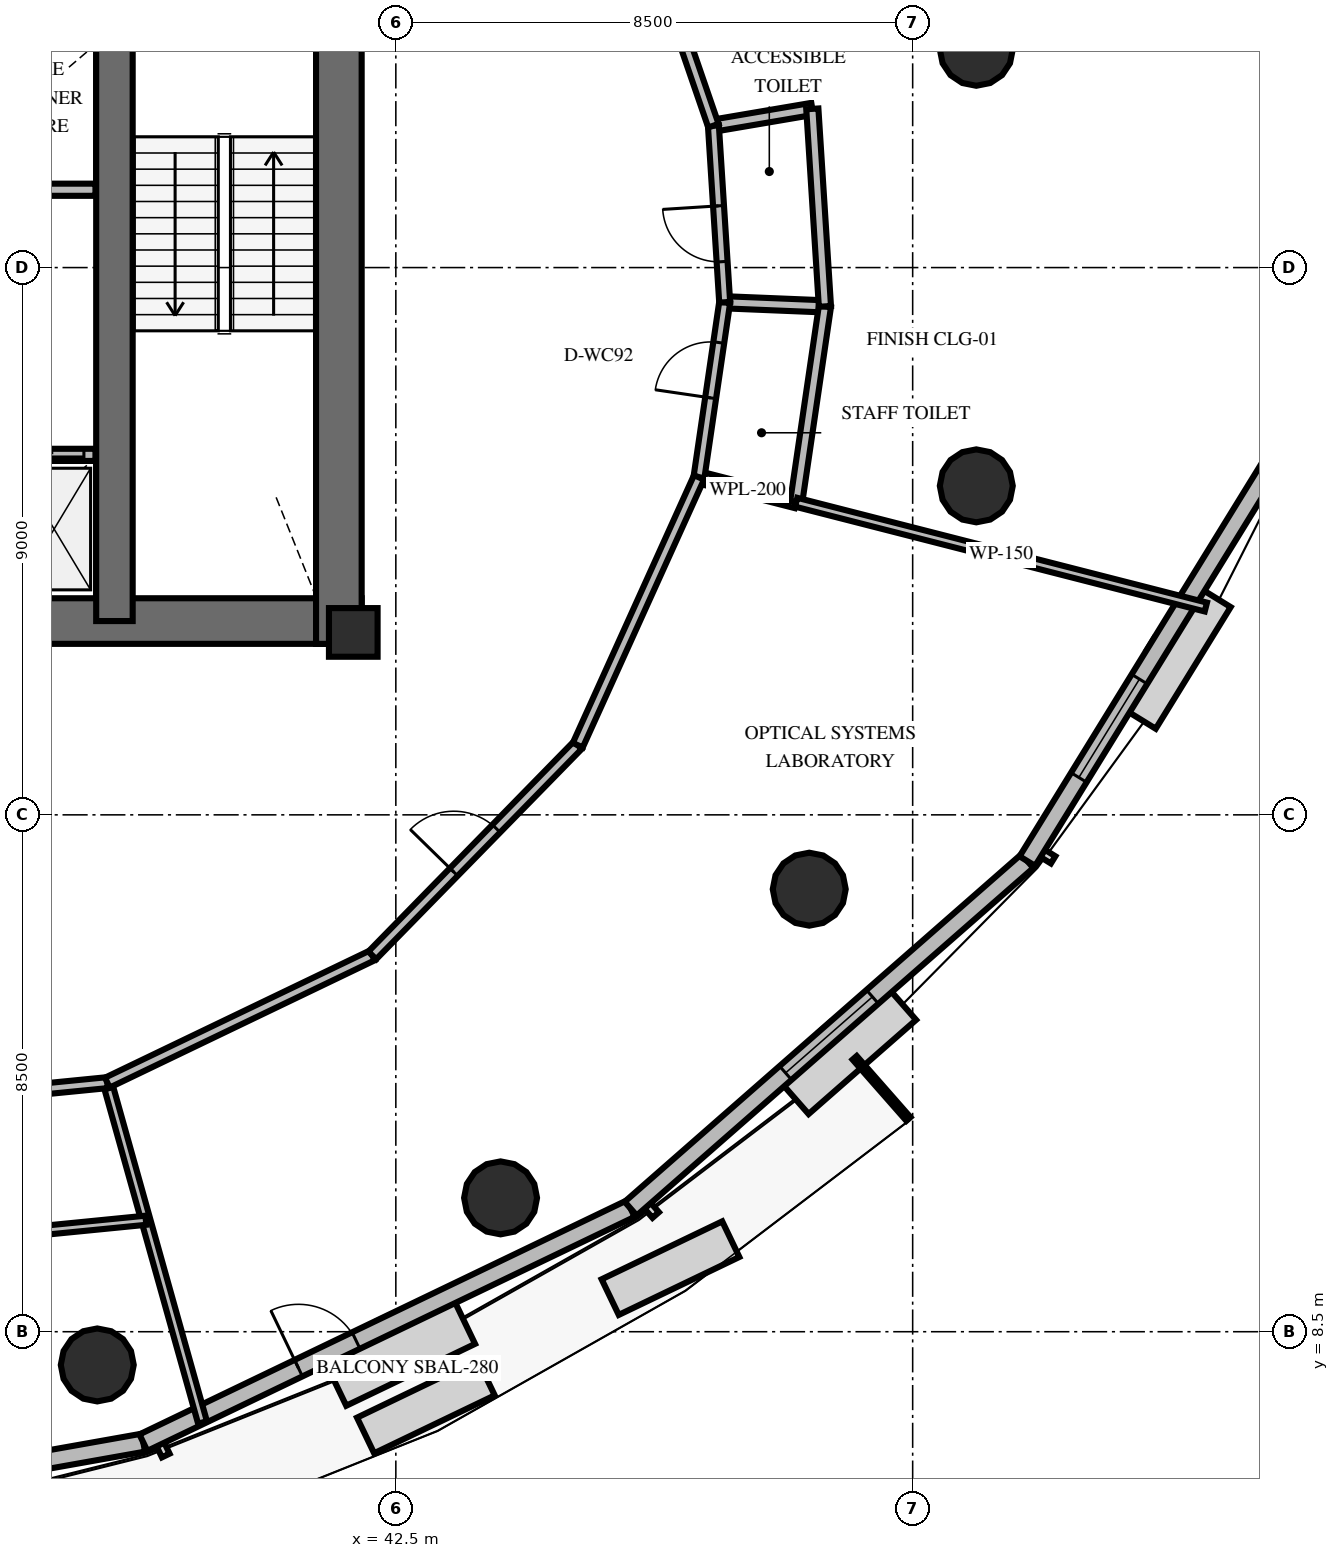
"""IFC4 building model, lengths in metres.
Left out: names, types, materials, properties, quantities, classifications, styles, units other than length and angle.
Written with IfcOpenShell. Run it as: python <this file> out.ifc"""

import sys

from ifc_helpers import new_model, si_unit, direction, frame, frame_2d, origin, origin_2d, place, context, subcontext, project, spatial, rectangle, circle, extrude, element, fill, save


model = new_model("IFC4")
c1 = context("Model", 3, precision=1e-05, world=origin(), true_north=direction((0.0, 1.0)))
c2 = subcontext(c1, "Body", "Model", "MODEL_VIEW")
j1 = project(units=[si_unit("LENGTHUNIT", "METRE"), si_unit("PLANEANGLEUNIT", "RADIAN")], contexts=[c1])
p1 = place(None, origin())
s1 = spatial("IfcSite", under=j1, at=p1, CompositionType="ELEMENT")
p2 = place(p1, origin())
s2 = spatial("IfcBuilding", under=s1, at=p2, CompositionType="ELEMENT")
p3 = place(p2, frame((0.0, 0.0, 141.8)))
s3 = spatial("IfcBuildingStorey", under=s2, at=p3, CompositionType="ELEMENT", Elevation=141.8)
p4 = place(p3, frame((26.072, 20.187, 0.0), z_axis=(0.0, 0.0, 1.0), x_axis=(1.0, 0.0, 0.0)))
e1 = element("IfcWall", 1, at=p4, inside=s3, PredefinedType="SHEAR", context=c2, shape_type="SweptSolid", body=[
    extrude(rectangle(XDim=15.866, YDim=0.75, at=frame_2d((7.933, 0.0))), origin(), (0.0, 0.0, 1.0), 4.0),
])
p5 = place(p3, frame((41.563, 19.812, 0.0), z_axis=(0.0, 0.0, 1.0), x_axis=(0.0, 1.0, 0.0)))
e2 = element("IfcWall", 2, at=p5, inside=s3, PredefinedType="SHEAR", context=c2, shape_type="SweptSolid", body=[
    extrude(rectangle(XDim=10.576, YDim=0.75, at=frame_2d((5.288, 0.0))), origin(), (0.0, 0.0, 1.0), 4.0),
])
p6 = place(p3, frame((37.872, 20.187, 0.0), z_axis=(0.0, 0.0, 1.0), x_axis=(0.0, 1.0, 0.0)))
e3 = element("IfcWall", 3, at=p6, inside=s3, PredefinedType="SHEAR", context=c2, shape_type="SweptSolid", body=[
    extrude(rectangle(XDim=9.826, YDim=0.6, at=frame_2d((4.913, 0.0))), origin(), (0.0, 0.0, 1.0), 4.0),
])
p7 = place(p3, frame((41.8, 20.0, 0.0), z_axis=(0.0, 0.0, 1.0), x_axis=(1.0, 0.0, 0.0)))
e4 = element("IfcColumn", 4, at=p7, inside=s3, PredefinedType="PILASTER", context=c2, shape_type="SweptSolid", body=[
    extrude(rectangle(XDim=0.8, YDim=0.8, at=origin_2d()), origin(), (0.0, 0.0, 1.0), 4.0),
])
for number, where, z_axis, x_axis in (
    (5, (52.046, 29.59, 0.0), (0.0, 0.0, 1.0), (1.0, 0.0, 0.0)),
    (6, (37.59, 7.954, 0.0), (0.0, 0.0, 1.0), (1.0, 0.0, 0.0)),
    (7, (44.222, 10.701, 0.0), (0.0, 0.0, 1.0), (1.0, 0.0, 0.0)),
    (8, (49.299, 15.778, 0.0), (0.0, 0.0, 1.0), (1.0, 0.0, 0.0)),
    (9, (52.046, 22.41, 0.0), (0.0, 0.0, 1.0), (1.0, 0.0, 0.0)),
):
    element("IfcColumn", number, at=place(p3, frame(where, z_axis=z_axis, x_axis=x_axis)), inside=s3, PredefinedType="COLUMN", context=c2, shape_type="SweptSolid", body=[
        extrude(circle(Radius=0.6, at=origin_2d()), origin(), (0.0, 0.0, 1.0), 4.0),
    ])
p8 = place(p3, frame((29.809, 5.158, 0.0), z_axis=(0.0, 0.0, 1.0), x_axis=(0.984567142926, 0.175007260052, 0.0)))
e10 = element("IfcWall", 10, at=p8, inside=s3, PredefinedType="SOLIDWALL", context=c2, shape_type="SweptSolid", body=[
    extrude(rectangle(XDim=8.673, YDim=0.3, at=frame_2d((4.336, 0.0))), origin(), (0.0, 0.0, 1.0), 2.9),
])
p9 = place(p8, frame((3.386, 0.0, 0.8)))
e11 = element("IfcOpeningElement", 11, at=p9, cuts=e10, PredefinedType="OPENING", context=c2, shape_type="SweptSolid", body=[
    extrude(rectangle(XDim=1.9, YDim=1.95, at=frame_2d((0.95, 0.975))), frame((0.0, 0.16, 0.0), z_axis=(0.0, -1.0, 0.0), x_axis=(1.0, 0.0, 0.0)), (0.0, 0.0, 1.0), 0.32),
])
p10 = place(p3, frame((38.348, 6.676, 0.0), z_axis=(0.0, 0.0, 1.0), x_axis=(0.901452771154, 0.432877466933, 0.0)))
e12 = element("IfcWall", 12, at=p10, inside=s3, PredefinedType="SOLIDWALL", context=c2, shape_type="SweptSolid", body=[
    extrude(rectangle(XDim=8.891, YDim=0.3, at=frame_2d((4.445, 0.0))), origin(), (0.0, 0.0, 1.0), 2.9),
])
p11 = place(p10, frame((2.83, 0.0, 0.0)))
e13 = element("IfcOpeningElement", 13, at=p11, cuts=e12, PredefinedType="OPENING", context=c2, shape_type="SweptSolid", body=[
    extrude(rectangle(XDim=1.05, YDim=2.15, at=frame_2d((0.525, 1.075))), frame((0.0, 0.16, 0.0), z_axis=(0.0, -1.0, 0.0), x_axis=(1.0, 0.0, 0.0)), (0.0, 0.0, 1.0), 0.32),
])
p12 = place(p3, frame((46.363, 10.524, 0.0), z_axis=(0.0, 0.0, 1.0), x_axis=(0.752158034989, 0.658982769427, 0.0)))
e14 = element("IfcWall", 14, at=p12, inside=s3, PredefinedType="SOLIDWALL", context=c2, shape_type="SweptSolid", body=[
    extrude(rectangle(XDim=8.673, YDim=0.3, at=frame_2d((4.336, 0.0))), origin(), (0.0, 0.0, 1.0), 2.9),
])
p13 = place(p12, frame((3.386, 0.0, 0.8)))
e15 = element("IfcOpeningElement", 15, at=p13, cuts=e14, PredefinedType="OPENING", context=c2, shape_type="SweptSolid", body=[
    extrude(rectangle(XDim=1.9, YDim=1.95, at=frame_2d((0.95, 0.975))), frame((0.0, 0.16, 0.0), z_axis=(0.0, -1.0, 0.0), x_axis=(1.0, 0.0, 0.0)), (0.0, 0.0, 1.0), 0.32),
])
p14 = place(p3, frame((52.886, 16.24, 0.0), z_axis=(0.0, 0.0, 1.0), x_axis=(0.524470936868, 0.851428350703, 0.0)))
e16 = element("IfcWall", 16, at=p14, inside=s3, PredefinedType="SOLIDWALL", context=c2, shape_type="SweptSolid", body=[
    extrude(rectangle(XDim=8.095, YDim=0.3, at=frame_2d((4.047, 0.0))), origin(), (0.0, 0.0, 1.0), 2.9),
])
p15 = place(p14, frame((1.615, 0.0, 0.8)))
e17 = element("IfcOpeningElement", 17, at=p15, cuts=e16, PredefinedType="OPENING", context=c2, shape_type="SweptSolid", body=[
    extrude(rectangle(XDim=1.9, YDim=1.95, at=frame_2d((0.95, 0.975))), frame((0.0, 0.16, 0.0), z_axis=(0.0, -1.0, 0.0), x_axis=(1.0, 0.0, 0.0)), (0.0, 0.0, 1.0), 0.32),
])
p16 = place(p3, frame((34.75, 22.92, 0.0), z_axis=(0.0, 0.0, 1.0), x_axis=(1.0, 0.0, 0.0)))
e18 = element("IfcWall", 18, at=p16, inside=s3, PredefinedType="SOLIDWALL", context=c2, shape_type="SweptSolid", body=[
    extrude(rectangle(XDim=2.81, YDim=0.2, at=frame_2d((1.405, 0.0))), origin(), (0.0, 0.0, 1.0), 2.8),
])
p17 = place(p16, frame((0.19, 0.0, 0.0)))
e19 = element("IfcOpeningElement", 19, at=p17, cuts=e18, PredefinedType="OPENING", context=c2, shape_type="SweptSolid", body=[
    extrude(rectangle(XDim=1.05, YDim=2.1, at=frame_2d((0.525, 1.05))), frame((0.0, 0.11, 0.0), z_axis=(0.0, -1.0, 0.0), x_axis=(1.0, 0.0, 0.0)), (0.0, 0.0, 1.0), 0.22),
])
p18 = place(p16, frame((1.57, 0.0, 0.0)))
e20 = element("IfcOpeningElement", 20, at=p18, cuts=e18, PredefinedType="OPENING", context=c2, shape_type="SweptSolid", body=[
    extrude(rectangle(XDim=1.05, YDim=2.1, at=frame_2d((0.525, 1.05))), frame((0.0, 0.11, 0.0), z_axis=(0.0, -1.0, 0.0), x_axis=(1.0, 0.0, 0.0)), (0.0, 0.0, 1.0), 0.22),
])
p19 = place(p3, frame((34.75, 27.28, 0.0), z_axis=(0.0, 0.0, 1.0), x_axis=(1.0, 0.0, 0.0)))
e21 = element("IfcWall", 21, at=p19, inside=s3, PredefinedType="SOLIDWALL", context=c2, shape_type="SweptSolid", body=[
    extrude(rectangle(XDim=2.81, YDim=0.2, at=frame_2d((1.405, 0.0))), origin(), (0.0, 0.0, 1.0), 2.8),
])
for number, where, z_axis, x_axis in (
    (22, (47.486, 22.55, 0.0), (0.0, 0.0, 1.0), (0.969, -0.248, 0.0)),
    (23, (47.908, 25.429, 0.0), (0.0, 0.0, 1.0), (0.999, -0.041, 0.0)),
):
    element("IfcWall", number, at=place(p3, frame(where, z_axis=z_axis, x_axis=x_axis)), inside=s3, PredefinedType="PLUMBINGWALL", context=c2, shape_type="SweptSolid", body=[
        extrude(rectangle(XDim=1.65, YDim=0.2, at=frame_2d((0.825, 0.0))), origin(), (0.0, 0.0, 1.0), 2.8),
    ])
p20 = place(p3, frame((49.084, 22.141, 0.0), z_axis=(0.0, 0.0, 1.0), x_axis=(0.145211109392, 0.989400694213, 0.0)))
e24 = element("IfcWall", 24, at=p20, inside=s3, PredefinedType="PLUMBINGWALL", context=c2, shape_type="SweptSolid", body=[
    extrude(rectangle(XDim=3.255, YDim=0.2, at=frame_2d((1.627, 0.0))), origin(), (0.0, 0.0, 1.0), 2.8),
])
p21 = place(p3, frame((47.486, 22.55, 0.0), z_axis=(0.0, 0.0, 1.0), x_axis=(0.145225883829, 0.989398525704, 0.0)))
e25 = element("IfcWall", 25, at=p21, inside=s3, PredefinedType="PARTITIONING", context=c2, shape_type="SweptSolid", body=[
    extrude(rectangle(XDim=2.91, YDim=0.18, at=frame_2d((1.455, 0.0))), origin(), (0.0, 0.0, 1.0), 2.8),
])
p22 = place(p21, frame((1.321, 0.0, 0.0)))
e26 = element("IfcOpeningElement", 26, at=p22, cuts=e25, PredefinedType="OPENING", context=c2, shape_type="SweptSolid", body=[
    extrude(rectangle(XDim=0.92, YDim=2.1, at=frame_2d((0.46, 1.05))), frame((0.0, 0.1, 0.0), z_axis=(0.0, -1.0, 0.0), x_axis=(1.0, 0.0, 0.0)), (0.0, 0.0, 1.0), 0.2),
])
p23 = place(p3, frame((47.723, 28.333, 0.0), z_axis=(0.0, 0.0, 1.0), x_axis=(0.98584875631, 0.167637196593, 0.0)))
e27 = element("IfcWall", 27, at=p23, inside=s3, PredefinedType="PLUMBINGWALL", context=c2, shape_type="SweptSolid", body=[
    extrude(rectangle(XDim=1.65, YDim=0.2, at=frame_2d((0.825, 0.0))), origin(), (0.0, 0.0, 1.0), 2.8),
])
p24 = place(p3, frame((49.557, 25.362, 0.0), z_axis=(0.0, 0.0, 1.0), x_axis=(-0.063676314671, 0.997970604251, 0.0)))
e28 = element("IfcWall", 28, at=p24, inside=s3, PredefinedType="PLUMBINGWALL", context=c2, shape_type="SweptSolid", body=[
    extrude(rectangle(XDim=3.255, YDim=0.2, at=frame_2d((1.627, 0.0))), origin(), (0.0, 0.0, 1.0), 2.8),
])
p25 = place(p3, frame((47.908, 25.429, 0.0), z_axis=(0.0, 0.0, 1.0), x_axis=(-0.063673489027, 0.99797078454, 0.0)))
e29 = element("IfcWall", 29, at=p25, inside=s3, PredefinedType="PARTITIONING", context=c2, shape_type="SweptSolid", body=[
    extrude(rectangle(XDim=2.91, YDim=0.18, at=frame_2d((1.455, 0.0))), origin(), (0.0, 0.0, 1.0), 2.8),
])
p26 = place(p25, frame((0.669, 0.0, 0.0)))
e30 = element("IfcOpeningElement", 30, at=p26, cuts=e29, PredefinedType="OPENING", context=c2, shape_type="SweptSolid", body=[
    extrude(rectangle(XDim=0.92, YDim=2.1, at=frame_2d((0.46, 1.05))), frame((0.0, 0.1, 0.0), z_axis=(0.0, -1.0, 0.0), x_axis=(1.0, 0.0, 0.0)), (0.0, 0.0, 1.0), 0.2),
])
p27 = place(p3, frame((49.084, 22.141, 0.0), z_axis=(0.0, 0.0, 1.0), x_axis=(0.968793883373, -0.247867729926, 0.0)))
e31 = element("IfcWall", 31, at=p27, inside=s3, PredefinedType="PARTITIONING", context=c2, shape_type="SweptSolid", body=[
    extrude(rectangle(XDim=6.955, YDim=0.15, at=frame_2d((3.478, 0.0))), origin(), (0.0, 0.0, 1.0), 2.8),
])
p28 = place(p3, frame((47.723, 28.333, 0.0), z_axis=(0.0, 0.0, 1.0), x_axis=(-0.325265650581, 0.945622681915, 0.0)))
e32 = element("IfcWall", 32, at=p28, inside=s3, PredefinedType="PARTITIONING", context=c2, shape_type="SweptSolid", body=[
    extrude(rectangle(XDim=4.515, YDim=0.18, at=frame_2d((2.257, 0.0))), origin(), (0.0, 0.0, 1.0), 2.8),
])
p29 = place(p28, frame((2.561, 0.0, 0.0)))
e33 = element("IfcOpeningElement", 33, at=p29, cuts=e32, PredefinedType="OPENING", context=c2, shape_type="SweptSolid", body=[
    extrude(rectangle(XDim=1.0, YDim=2.15, at=frame_2d((0.5, 1.075))), frame((0.0, 0.1, 0.0), z_axis=(0.0, -1.0, 0.0), x_axis=(1.0, 0.0, 0.0)), (0.0, 0.0, 1.0), 0.2),
])
p30 = place(p3, frame((37.755, 12.596, 0.0), z_axis=(0.0, 0.0, 1.0), x_axis=(0.269750077606, -0.962930369046, 0.0)))
e34 = element("IfcWall", 34, at=p30, inside=s3, PredefinedType="PARTITIONING", context=c2, shape_type="SweptSolid", body=[
    extrude(rectangle(XDim=5.803, YDim=0.15, at=frame_2d((2.902, 0.0))), origin(), (0.0, 0.0, 1.0), 2.8),
])
p31 = place(p3, frame((32.944, 12.12, 0.0), z_axis=(0.0, 0.0, 1.0), x_axis=(0.9951446032, 0.098423669524, 0.0)))
e35 = element("IfcWall", 35, at=p31, inside=s3, PredefinedType="PARTITIONING", context=c2, shape_type="SweptSolid", body=[
    extrude(rectangle(XDim=4.834, YDim=0.18, at=frame_2d((2.417, 0.0))), origin(), (0.0, 0.0, 1.0), 2.8),
])
p32 = place(p31, frame((1.034, 0.0, 0.0)))
e36 = element("IfcOpeningElement", 36, at=p32, cuts=e35, PredefinedType="OPENING", context=c2, shape_type="SweptSolid", body=[
    extrude(rectangle(XDim=1.0, YDim=2.15, at=frame_2d((0.5, 1.075))), frame((0.0, 0.1, 0.0), z_axis=(0.0, -1.0, 0.0), x_axis=(1.0, 0.0, 0.0)), (0.0, 0.0, 1.0), 0.2),
])
p33 = place(p3, frame((32.766, 9.777, 0.0), z_axis=(0.0, 0.0, 1.0), x_axis=(0.995140176987, 0.098468411921, 0.0)))
e37 = element("IfcWall", 37, at=p33, inside=s3, PredefinedType="PARTITIONING", context=c2, shape_type="SweptSolid", body=[
    extrude(rectangle(XDim=5.65, YDim=0.15, at=frame_2d((2.825, 0.0))), origin(), (0.0, 0.0, 1.0), 2.8),
])
p34 = place(p33, frame((1.265, 0.0, 0.0)))
e38 = element("IfcOpeningElement", 38, at=p34, cuts=e37, PredefinedType="OPENING", context=c2, shape_type="SweptSolid", body=[
    extrude(rectangle(XDim=0.95, YDim=2.15, at=frame_2d((0.475, 1.075))), frame((0.0, 0.085, 0.0), z_axis=(0.0, -1.0, 0.0), x_axis=(1.0, 0.0, 0.0)), (0.0, 0.0, 1.0), 0.17),
])
p35 = place(p3, frame((37.755, 12.596, 0.0), z_axis=(0.0, 0.0, 1.0), x_axis=(0.901444237196, 0.432895238165, 0.0)))
e39 = element("IfcWall", 39, at=p35, inside=s3, PredefinedType="PARTITIONING", context=c2, shape_type="SweptSolid", body=[
    extrude(rectangle(XDim=4.834, YDim=0.18, at=frame_2d((2.417, 0.0))), origin(), (0.0, 0.0, 1.0), 2.8),
])
p36 = place(p3, frame((42.113, 14.689, 0.0), z_axis=(0.0, 0.0, 1.0), x_axis=(0.699031567745, 0.715090810524, 0.0)))
e40 = element("IfcWall", 40, at=p36, inside=s3, PredefinedType="PARTITIONING", context=c2, shape_type="SweptSolid", body=[
    extrude(rectangle(XDim=4.834, YDim=0.18, at=frame_2d((2.417, 0.0))), origin(), (0.0, 0.0, 1.0), 2.8),
])
p37 = place(p36, frame((1.917, 0.0, 0.0)))
e41 = element("IfcOpeningElement", 41, at=p37, cuts=e40, PredefinedType="OPENING", context=c2, shape_type="SweptSolid", body=[
    extrude(rectangle(XDim=1.0, YDim=2.15, at=frame_2d((0.5, 1.075))), frame((0.0, 0.1, 0.0), z_axis=(0.0, -1.0, 0.0), x_axis=(1.0, 0.0, 0.0)), (0.0, 0.0, 1.0), 0.2),
])
p38 = place(p3, frame((45.492, 18.146, 0.0), z_axis=(0.0, 0.0, 1.0), x_axis=(0.412295629085, 0.911050116205, 0.0)))
e42 = element("IfcWall", 42, at=p38, inside=s3, PredefinedType="PARTITIONING", context=c2, shape_type="SweptSolid", body=[
    extrude(rectangle(XDim=4.834, YDim=0.18, at=frame_2d((2.417, 0.0))), origin(), (0.0, 0.0, 1.0), 2.8),
])
p39 = place(p11, origin())
e43 = element("IfcDoor", 43, at=p39, inside=s3, OperationType="SINGLE_SWING_LEFT", PredefinedType="DOOR", context=c2, shape_type="SweptSolid", body=[
    extrude(rectangle(XDim=1.05, YDim=2.15, at=frame_2d((0.525, 1.075))), frame((0.0, 0.025, 0.0), z_axis=(0.0, -1.0, 0.0), x_axis=(1.0, 0.0, 0.0)), (0.0, 0.0, 1.0), 0.05),
])
fill(e13, e43)
p40 = place(p13, origin())
e44 = element("IfcWindow", 44, at=p40, inside=s3, PartitioningType="SINGLE_PANEL", PredefinedType="WINDOW", context=c2, shape_type="SweptSolid", body=[
    extrude(rectangle(XDim=1.9, YDim=1.95, at=frame_2d((0.95, 0.975))), frame((0.0, 0.03, 0.0), z_axis=(0.0, -1.0, 0.0), x_axis=(1.0, 0.0, 0.0)), (0.0, 0.0, 1.0), 0.06),
])
fill(e15, e44)
p41 = place(p15, origin())
e45 = element("IfcWindow", 45, at=p41, inside=s3, PartitioningType="SINGLE_PANEL", PredefinedType="WINDOW", context=c2, shape_type="SweptSolid", body=[
    extrude(rectangle(XDim=1.9, YDim=1.95, at=frame_2d((0.95, 0.975))), frame((0.0, 0.03, 0.0), z_axis=(0.0, -1.0, 0.0), x_axis=(1.0, 0.0, 0.0)), (0.0, 0.0, 1.0), 0.06),
])
fill(e17, e45)
p42 = place(p18, origin())
e46 = element("IfcDoor", 46, at=p42, inside=s3, OperationType="DOUBLE_DOOR_SLIDING", PredefinedType="USERDEFINED", context=c2, shape_type="SweptSolid", body=[
    extrude(rectangle(XDim=1.05, YDim=2.1, at=frame_2d((0.525, 1.05))), frame((0.0, 0.025, 0.0), z_axis=(0.0, -1.0, 0.0), x_axis=(1.0, 0.0, 0.0)), (0.0, 0.0, 1.0), 0.05),
])
fill(e20, e46)
p43 = place(p22, origin())
e47 = element("IfcDoor", 47, at=p43, inside=s3, OperationType="SINGLE_SWING_LEFT", PredefinedType="DOOR", context=c2, shape_type="SweptSolid", body=[
    extrude(rectangle(XDim=0.92, YDim=2.1, at=frame_2d((0.46, 1.05))), frame((0.0, 0.025, 0.0), z_axis=(0.0, -1.0, 0.0), x_axis=(1.0, 0.0, 0.0)), (0.0, 0.0, 1.0), 0.05),
])
fill(e26, e47)
p44 = place(p26, origin())
e48 = element("IfcDoor", 48, at=p44, inside=s3, OperationType="SINGLE_SWING_RIGHT", PredefinedType="DOOR", context=c2, shape_type="SweptSolid", body=[
    extrude(rectangle(XDim=0.92, YDim=2.1, at=frame_2d((0.46, 1.05))), frame((0.0, 0.025, 0.0), z_axis=(0.0, -1.0, 0.0), x_axis=(1.0, 0.0, 0.0)), (0.0, 0.0, 1.0), 0.05),
])
fill(e30, e48)
p45 = place(p37, origin())
e49 = element("IfcDoor", 49, at=p45, inside=s3, OperationType="SINGLE_SWING_LEFT", PredefinedType="DOOR", context=c2, shape_type="SweptSolid", body=[
    extrude(rectangle(XDim=1.0, YDim=2.15, at=frame_2d((0.5, 1.075))), frame((0.0, 0.025, 0.0), z_axis=(0.0, -1.0, 0.0), x_axis=(1.0, 0.0, 0.0)), (0.0, 0.0, 1.0), 0.05),
])
fill(e41, e49)
save(model, sys.argv[1])
